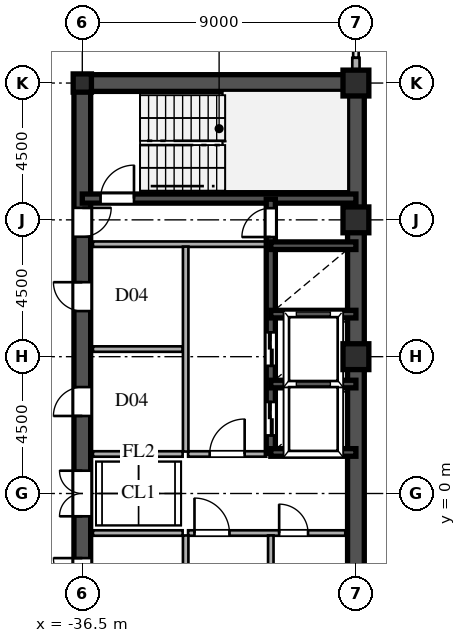
"""IFC4 building model, lengths in metres.
Left out: names, types, materials, properties, quantities, classifications, styles, units other than length and angle.
Written with IfcOpenShell. Run it as: python <this file> out.ifc"""

import sys

from ifc_helpers import new_model, si_unit, direction, frame, frame_2d, origin, origin_2d, place, context, subcontext, project, spatial, rectangle, hollow_rectangle, i_section, extrude, source, transform, mapped, element, fill, save


model = new_model("IFC4")
c1 = context("Model", 3, precision=1e-05, world=origin(), true_north=direction((0.0, 1.0)))
c2 = subcontext(c1, "Body", "Model", "MODEL_VIEW")
j1 = project(units=[si_unit("LENGTHUNIT", "METRE"), si_unit("PLANEANGLEUNIT", "RADIAN")], contexts=[c1])
p1 = place(None, origin())
s1 = spatial("IfcSite", under=j1, at=p1, CompositionType="ELEMENT")
p2 = place(p1, origin())
s2 = spatial("IfcBuilding", under=s1, at=p2, CompositionType="ELEMENT")
p3 = place(p2, frame((0.0, 0.0, 181.5)))
s3 = spatial("IfcBuildingStorey", under=s2, at=p3, CompositionType="ELEMENT", Elevation=181.5)
m1 = source(origin(), c2, "Body", "SweptSolid", [
    extrude(hollow_rectangle(XDim=0.85, YDim=0.85, WallThickness=0.036, at=origin_2d()), origin(), (0.0, 0.0, 1.0), 3.6),
])
for number, where, z_axis, x_axis in (
    (1, (-27.5, 4.5, 0.0), (0.0, 0.0, 1.0), (1.0, 0.0, 0.0)),
    (2, (-27.5, 9.0, 0.0), (0.0, 0.0, 1.0), (1.0, 0.0, 0.0)),
    (3, (-27.5, 13.5, 0.0), (0.0, 0.0, 1.0), (1.0, 0.0, 0.0)),
):
    element("IfcColumn", number, at=place(p3, frame(where, z_axis=z_axis, x_axis=x_axis)), inside=s3, PredefinedType="COLUMN", context=c2, shape_type="MappedRepresentation", body=[
        mapped(m1, transform((0.0, 0.0, 0.0), scale=1.0)),
    ])
m2 = source(origin(), c2, "Body", "SweptSolid", [
    extrude(i_section(OverallWidth=0.6, OverallDepth=0.6, WebThickness=0.025, FlangeThickness=0.04, at=origin_2d()), origin(), (0.0, 0.0, 1.0), 3.6),
])
p4 = place(p3, frame((-36.5, 13.5, 0.0), z_axis=(0.0, 0.0, 1.0), x_axis=(1.0, 0.0, 0.0)))
e4 = element("IfcColumn", 4, at=p4, inside=s3, PredefinedType="COLUMN", context=c2, shape_type="MappedRepresentation", body=[
    mapped(m2, transform((0.0, 0.0, 0.0), scale=1.0)),
])
p5 = place(p3, frame((-27.5, 13.78, 0.0), z_axis=(0.0, 0.0, 1.0), x_axis=(0.0, 1.0, 0.0)))
e5 = element("IfcWall", 5, at=p5, inside=s3, PredefinedType="SOLIDWALL", context=c2, shape_type="SweptSolid", body=[
    extrude(rectangle(XDim=0.55, YDim=0.24, at=frame_2d((0.275, 0.0))), origin(), (0.0, 0.0, 1.0), 2.88),
])
for number, where, z_axis, x_axis in (
    (6, (-27.5, -13.5, 0.0), (0.0, 0.0, 1.0), (0.0, 1.0, 0.0)),
    (7, (-27.5, 1.3, 0.0), (0.0, 0.0, 1.0), (0.0, 1.0, 0.0)),
):
    element("IfcWall", number, at=place(p3, frame(where, z_axis=z_axis, x_axis=x_axis)), inside=s3, PredefinedType="SHEAR", context=c2, shape_type="SweptSolid", body=[
        extrude(rectangle(XDim=12.2, YDim=0.55, at=frame_2d((6.1, 0.0))), origin(), (0.0, 0.0, 1.0), 3.38),
    ])
p6 = place(p3, frame((-27.5, -1.3, 0.0), z_axis=(0.0, 0.0, 1.0), x_axis=(0.0, 1.0, 0.0)))
e8 = element("IfcWall", 8, at=p6, inside=s3, PredefinedType="SHEAR", context=c2, shape_type="SweptSolid", body=[
    extrude(rectangle(XDim=2.6, YDim=0.55, at=frame_2d((1.3, 0.0))), origin(), (0.0, 0.0, 1.0), 3.38),
])
p7 = place(p3, frame((-36.5, 13.5, 0.0), z_axis=(0.0, 0.0, 1.0), x_axis=(1.0, 0.0, 0.0)))
e9 = element("IfcWall", 9, at=p7, inside=s3, PredefinedType="SHEAR", context=c2, shape_type="SweptSolid", body=[
    extrude(rectangle(XDim=9.0, YDim=0.55, at=frame_2d((4.5, 0.0))), origin(), (0.0, 0.0, 1.0), 3.38),
])
p8 = place(p3, frame((-36.5, -1.3, 0.0), z_axis=(0.0, 0.0, 1.0), x_axis=(0.0, 1.0, 0.0)))
e10 = element("IfcWall", 10, at=p8, inside=s3, PredefinedType="SHEAR", context=c2, shape_type="SweptSolid", body=[
    extrude(rectangle(XDim=2.6, YDim=0.55, at=frame_2d((1.3, 0.0))), origin(), (0.0, 0.0, 1.0), 3.38),
])
p9 = place(p8, frame((0.55, 0.0, 0.0)))
e11 = element("IfcOpeningElement", 11, at=p9, cuts=e10, PredefinedType="OPENING", context=c2, shape_type="SweptSolid", body=[
    extrude(rectangle(XDim=1.5, YDim=2.3, at=frame_2d((0.75, 1.15))), frame((0.0, 0.285, 0.0), z_axis=(0.0, -1.0, 0.0), x_axis=(1.0, 0.0, 0.0)), (0.0, 0.0, 1.0), 0.57),
])
p10 = place(p3, frame((-36.5, 8.2, 0.0), z_axis=(0.0, 0.0, 1.0), x_axis=(0.0, 1.0, 0.0)))
e12 = element("IfcWall", 12, at=p10, inside=s3, PredefinedType="SHEAR", context=c2, shape_type="SweptSolid", body=[
    extrude(rectangle(XDim=5.45, YDim=0.55, at=frame_2d((2.725, 0.0))), origin(), (0.0, 0.0, 1.0), 3.38),
])
p11 = place(p10, frame((0.245, 0.0, 0.0)))
e13 = element("IfcOpeningElement", 13, at=p11, cuts=e12, PredefinedType="OPENING", context=c2, shape_type="SweptSolid", body=[
    extrude(rectangle(XDim=0.95, YDim=2.15, at=frame_2d((0.475, 1.075))), frame((0.0, 0.285, 0.0), z_axis=(0.0, -1.0, 0.0), x_axis=(1.0, 0.0, 0.0)), (0.0, 0.0, 1.0), 0.57),
])
p12 = place(p3, frame((-36.5, -3.9, 0.0), z_axis=(0.0, 0.0, 1.0), x_axis=(0.0, 1.0, 0.0)))
e14 = element("IfcWall", 14, at=p12, inside=s3, PredefinedType="SHEAR", context=c2, shape_type="SweptSolid", body=[
    extrude(rectangle(XDim=2.6, YDim=0.55, at=frame_2d((1.3, 0.0))), origin(), (0.0, 0.0, 1.0), 3.38),
])
p13 = place(p12, frame((0.825, 0.0, 0.0)))
e15 = element("IfcOpeningElement", 15, at=p13, cuts=e14, PredefinedType="OPENING", context=c2, shape_type="SweptSolid", body=[
    extrude(rectangle(XDim=0.95, YDim=2.15, at=frame_2d((0.475, 1.075))), frame((0.0, 0.285, 0.0), z_axis=(0.0, -1.0, 0.0), x_axis=(1.0, 0.0, 0.0)), (0.0, 0.0, 1.0), 0.57),
])
p14 = place(p3, frame((-36.5, 1.3, 0.0), z_axis=(0.0, 0.0, 1.0), x_axis=(0.0, 1.0, 0.0)))
e16 = element("IfcWall", 16, at=p14, inside=s3, PredefinedType="SHEAR", context=c2, shape_type="SweptSolid", body=[
    extrude(rectangle(XDim=3.45, YDim=0.55, at=frame_2d((1.725, 0.0))), origin(), (0.0, 0.0, 1.0), 3.38),
])
p15 = place(p14, frame((1.25, 0.0, 0.0)))
e17 = element("IfcOpeningElement", 17, at=p15, cuts=e16, PredefinedType="OPENING", context=c2, shape_type="SweptSolid", body=[
    extrude(rectangle(XDim=0.95, YDim=2.15, at=frame_2d((0.475, 1.075))), frame((0.0, 0.285, 0.0), z_axis=(0.0, -1.0, 0.0), x_axis=(1.0, 0.0, 0.0)), (0.0, 0.0, 1.0), 0.57),
])
p16 = place(p3, frame((-36.5, 4.75, 0.0), z_axis=(0.0, 0.0, 1.0), x_axis=(0.0, 1.0, 0.0)))
e18 = element("IfcWall", 18, at=p16, inside=s3, PredefinedType="SHEAR", context=c2, shape_type="SweptSolid", body=[
    extrude(rectangle(XDim=3.45, YDim=0.55, at=frame_2d((1.725, 0.0))), origin(), (0.0, 0.0, 1.0), 3.38),
])
p17 = place(p16, frame((1.25, 0.0, 0.0)))
e19 = element("IfcOpeningElement", 19, at=p17, cuts=e18, PredefinedType="OPENING", context=c2, shape_type="SweptSolid", body=[
    extrude(rectangle(XDim=0.95, YDim=2.15, at=frame_2d((0.475, 1.075))), frame((0.0, 0.285, 0.0), z_axis=(0.0, -1.0, 0.0), x_axis=(1.0, 0.0, 0.0)), (0.0, 0.0, 1.0), 0.57),
])
p18 = place(p3, frame((-36.5, 9.7, 0.0), z_axis=(0.0, 0.0, 1.0), x_axis=(1.0, 0.0, 0.0)))
e20 = element("IfcWall", 20, at=p18, inside=s3, PredefinedType="SHEAR", context=c2, shape_type="SweptSolid", body=[
    extrude(rectangle(XDim=9.0, YDim=0.3, at=frame_2d((4.5, 0.0))), origin(), (0.0, 0.0, 1.0), 3.38),
])
p19 = place(p18, frame((0.6, 0.0, 0.0)))
e21 = element("IfcOpeningElement", 21, at=p19, cuts=e20, PredefinedType="OPENING", context=c2, shape_type="SweptSolid", body=[
    extrude(rectangle(XDim=1.1, YDim=2.2, at=frame_2d((0.55, 1.1))), frame((0.0, 0.16, 0.0), z_axis=(0.0, -1.0, 0.0), x_axis=(1.0, 0.0, 0.0)), (0.0, 0.0, 1.0), 0.32),
])
for number, where, z_axis, x_axis in (
    (22, (-30.3, 1.35, 0.0), (0.0, 0.0, 1.0), (1.0, 0.0, 0.0)),
    (23, (-30.3, 3.6, 0.0), (0.0, 0.0, 1.0), (1.0, 0.0, 0.0)),
    (24, (-30.3, 5.9, 0.0), (0.0, 0.0, 1.0), (1.0, 0.0, 0.0)),
    (25, (-30.3, 8.15, 0.0), (0.0, 0.0, 1.0), (1.0, 0.0, 0.0)),
):
    element("IfcWall", number, at=place(p3, frame(where, z_axis=z_axis, x_axis=x_axis)), inside=s3, PredefinedType="SHEAR", context=c2, shape_type="SweptSolid", body=[
        extrude(rectangle(XDim=2.8, YDim=0.25, at=frame_2d((1.4, 0.0))), origin(), (0.0, 0.0, 1.0), 3.38),
    ])
p20 = place(p3, frame((-30.3, 1.32, 0.0), z_axis=(0.0, 0.0, 1.0), x_axis=(0.0, 1.0, 0.0)))
e26 = element("IfcWall", 26, at=p20, inside=s3, PredefinedType="SHEAR", context=c2, shape_type="SweptSolid", body=[
    extrude(rectangle(XDim=2.28, YDim=0.3, at=frame_2d((1.14, 0.0))), origin(), (0.0, 0.0, 1.0), 3.38),
])
p21 = place(p20, frame((0.59, 0.0, 0.0)))
e27 = element("IfcOpeningElement", 27, at=p21, cuts=e26, PredefinedType="OPENING", context=c2, shape_type="SweptSolid", body=[
    extrude(rectangle(XDim=1.1, YDim=2.2, at=frame_2d((0.55, 1.1))), frame((0.0, 0.16, 0.0), z_axis=(0.0, -1.0, 0.0), x_axis=(1.0, 0.0, 0.0)), (0.0, 0.0, 1.0), 0.32),
])
p22 = place(p3, frame((-30.3, 3.6, 0.0), z_axis=(0.0, 0.0, 1.0), x_axis=(0.0, 1.0, 0.0)))
e28 = element("IfcWall", 28, at=p22, inside=s3, PredefinedType="SHEAR", context=c2, shape_type="SweptSolid", body=[
    extrude(rectangle(XDim=2.3, YDim=0.3, at=frame_2d((1.15, 0.0))), origin(), (0.0, 0.0, 1.0), 3.38),
])
p23 = place(p22, frame((0.6, 0.0, 0.0)))
e29 = element("IfcOpeningElement", 29, at=p23, cuts=e28, PredefinedType="OPENING", context=c2, shape_type="SweptSolid", body=[
    extrude(rectangle(XDim=1.1, YDim=2.2, at=frame_2d((0.55, 1.1))), frame((0.0, 0.16, 0.0), z_axis=(0.0, -1.0, 0.0), x_axis=(1.0, 0.0, 0.0)), (0.0, 0.0, 1.0), 0.32),
])
p24 = place(p3, frame((-30.3, 5.9, 0.0), z_axis=(0.0, 0.0, 1.0), x_axis=(0.0, 1.0, 0.0)))
e30 = element("IfcWall", 30, at=p24, inside=s3, PredefinedType="SHEAR", context=c2, shape_type="SweptSolid", body=[
    extrude(rectangle(XDim=2.25, YDim=0.3, at=frame_2d((1.125, 0.0))), origin(), (0.0, 0.0, 1.0), 3.38),
])
p25 = place(p3, frame((-30.3, 8.15, 0.0), z_axis=(0.0, 0.0, 1.0), x_axis=(0.0, 1.0, 0.0)))
e31 = element("IfcWall", 31, at=p25, inside=s3, PredefinedType="SHEAR", context=c2, shape_type="SweptSolid", body=[
    extrude(rectangle(XDim=1.53, YDim=0.3, at=frame_2d((0.765, 0.0))), origin(), (0.0, 0.0, 1.0), 3.38),
])
p26 = place(p25, frame((0.285, 0.0, 0.0)))
e32 = element("IfcOpeningElement", 32, at=p26, cuts=e31, PredefinedType="OPENING", context=c2, shape_type="SweptSolid", body=[
    extrude(rectangle(XDim=0.95, YDim=2.15, at=frame_2d((0.475, 1.075))), frame((0.0, 0.16, 0.0), z_axis=(0.0, -1.0, 0.0), x_axis=(1.0, 0.0, 0.0)), (0.0, 0.0, 1.0), 0.32),
])
p27 = place(p3, frame((-36.15, 8.2, 0.0), z_axis=(0.0, 0.0, 1.0), x_axis=(1.0, 0.0, 0.0)))
e33 = element("IfcWall", 33, at=p27, inside=s3, PredefinedType="PARTITIONING", context=c2, shape_type="SweptSolid", body=[
    extrude(rectangle(XDim=5.7, YDim=0.18, at=frame_2d((2.85, 0.0))), origin(), (0.0, 0.0, 1.0), 3.38),
])
p28 = place(p3, frame((-33.1, -6.42, 0.0), z_axis=(0.0, 0.0, 1.0), x_axis=(0.0, 1.0, 0.0)))
e34 = element("IfcWall", 34, at=p28, inside=s3, PredefinedType="PARTITIONING", context=c2, shape_type="SweptSolid", body=[
    extrude(rectangle(XDim=5.04, YDim=0.18, at=frame_2d((2.52, 0.0))), origin(), (0.0, 0.0, 1.0), 3.38),
])
p29 = place(p3, frame((-33.1, 1.38, 0.0), z_axis=(0.0, 0.0, 1.0), x_axis=(0.0, 1.0, 0.0)))
e35 = element("IfcWall", 35, at=p29, inside=s3, PredefinedType="PARTITIONING", context=c2, shape_type="SweptSolid", body=[
    extrude(rectangle(XDim=6.74, YDim=0.18, at=frame_2d((3.37, 0.0))), origin(), (0.0, 0.0, 1.0), 3.38),
])
p30 = place(p3, frame((-30.3, -1.3, 0.0), z_axis=(0.0, 0.0, 1.0), x_axis=(1.0, 0.0, 0.0)))
e36 = element("IfcWall", 36, at=p30, inside=s3, PredefinedType="PARTITIONING", context=c2, shape_type="SweptSolid", body=[
    extrude(rectangle(XDim=2.45, YDim=0.18, at=frame_2d((1.225, 0.0))), origin(), (0.0, 0.0, 1.0), 3.38),
])
p31 = place(p30, frame((0.275, 0.0, 0.0)))
e37 = element("IfcOpeningElement", 37, at=p31, cuts=e36, PredefinedType="OPENING", context=c2, shape_type="SweptSolid", body=[
    extrude(rectangle(XDim=0.95, YDim=2.15, at=frame_2d((0.475, 1.075))), frame((0.0, 0.1, 0.0), z_axis=(0.0, -1.0, 0.0), x_axis=(1.0, 0.0, 0.0)), (0.0, 0.0, 1.0), 0.2),
])
p32 = place(p3, frame((-33.02, -1.3, 0.0), z_axis=(0.0, 0.0, 1.0), x_axis=(1.0, 0.0, 0.0)))
e38 = element("IfcWall", 38, at=p32, inside=s3, PredefinedType="PARTITIONING", context=c2, shape_type="SweptSolid", body=[
    extrude(rectangle(XDim=2.72, YDim=0.18, at=frame_2d((1.36, 0.0))), origin(), (0.0, 0.0, 1.0), 3.38),
])
p33 = place(p32, frame((0.21, 0.0, 0.0)))
e39 = element("IfcOpeningElement", 39, at=p33, cuts=e38, PredefinedType="OPENING", context=c2, shape_type="SweptSolid", body=[
    extrude(rectangle(XDim=1.15, YDim=2.2, at=frame_2d((0.575, 1.1))), frame((0.0, 0.1, 0.0), z_axis=(0.0, -1.0, 0.0), x_axis=(1.0, 0.0, 0.0)), (0.0, 0.0, 1.0), 0.2),
])
p34 = place(p3, frame((-30.3, -7.12, 0.0), z_axis=(0.0, 0.0, 1.0), x_axis=(0.0, 1.0, 0.0)))
e40 = element("IfcWall", 40, at=p34, inside=s3, PredefinedType="PARTITIONING", context=c2, shape_type="SweptSolid", body=[
    extrude(rectangle(XDim=5.74, YDim=0.18, at=frame_2d((2.87, 0.0))), origin(), (0.0, 0.0, 1.0), 3.38),
])
p35 = place(p3, frame((-33.02, 1.3, 0.0), z_axis=(0.0, 0.0, 1.0), x_axis=(1.0, 0.0, 0.0)))
e41 = element("IfcWall", 41, at=p35, inside=s3, PredefinedType="PARTITIONING", context=c2, shape_type="SweptSolid", body=[
    extrude(rectangle(XDim=2.57, YDim=0.18, at=frame_2d((1.285, 0.0))), origin(), (0.0, 0.0, 1.0), 3.38),
])
p36 = place(p35, frame((0.71, 0.0, 0.0)))
e42 = element("IfcOpeningElement", 42, at=p36, cuts=e41, PredefinedType="OPENING", context=c2, shape_type="SweptSolid", body=[
    extrude(rectangle(XDim=1.15, YDim=2.2, at=frame_2d((0.575, 1.1))), frame((0.0, 0.1, 0.0), z_axis=(0.0, -1.0, 0.0), x_axis=(1.0, 0.0, 0.0)), (0.0, 0.0, 1.0), 0.2),
])
for number, where, z_axis, x_axis in (
    (43, (-36.15, -1.3, 0.0), (0.0, 0.0, 1.0), (1.0, 0.0, 0.0)),
    (44, (-36.15, 1.3, 0.0), (0.0, 0.0, 1.0), (1.0, 0.0, 0.0)),
    (45, (-36.15, 4.75, 0.0), (0.0, 0.0, 1.0), (1.0, 0.0, 0.0)),
):
    element("IfcWall", number, at=place(p3, frame(where, z_axis=z_axis, x_axis=x_axis)), inside=s3, PredefinedType="PARTITIONING", context=c2, shape_type="SweptSolid", body=[
        extrude(rectangle(XDim=2.95, YDim=0.18, at=frame_2d((1.475, 0.0))), origin(), (0.0, 0.0, 1.0), 3.38),
    ])
m3 = source(origin(), c2, "Body", "SweptSolid", [
    extrude(rectangle(XDim=1.5, YDim=2.3, at=frame_2d((0.75, 1.15))), frame((0.0, 0.025, 0.0), z_axis=(0.0, -1.0, 0.0), x_axis=(1.0, 0.0, 0.0)), (0.0, 0.0, 1.0), 0.05),
])
p37 = place(p9, origin())
e46 = element("IfcDoor", 46, at=p37, inside=s3, OperationType="DOUBLE_SWING_LEFT", PredefinedType="DOOR", context=c2, shape_type="MappedRepresentation", body=[
    mapped(m3, transform((0.0, 0.0, 0.0), scale=1.0)),
])
fill(e11, e46)
m4 = source(origin(), c2, "Body", "SweptSolid", [
    extrude(rectangle(XDim=0.95, YDim=2.15, at=frame_2d((0.475, 1.075))), frame((0.0, 0.025, 0.0), z_axis=(0.0, -1.0, 0.0), x_axis=(1.0, 0.0, 0.0)), (0.0, 0.0, 1.0), 0.05),
])
p38 = place(p11, frame((0.95, 0.0, 0.0), z_axis=(0.0, 0.0, 1.0), x_axis=(-1.0, 0.0, 0.0)))
e47 = element("IfcDoor", 47, at=p38, inside=s3, OperationType="SINGLE_SWING_RIGHT", PredefinedType="DOOR", context=c2, shape_type="MappedRepresentation", body=[
    mapped(m4, transform((0.0, 0.0, 0.0), scale=1.0)),
])
fill(e13, e47)
p39 = place(p13, origin())
e48 = element("IfcDoor", 48, at=p39, inside=s3, OperationType="SINGLE_SWING_RIGHT", PredefinedType="DOOR", context=c2, shape_type="MappedRepresentation", body=[
    mapped(m4, transform((0.0, 0.0, 0.0), scale=1.0)),
])
fill(e15, e48)
p40 = place(p15, origin())
e49 = element("IfcDoor", 49, at=p40, inside=s3, OperationType="SINGLE_SWING_LEFT", PredefinedType="DOOR", context=c2, shape_type="MappedRepresentation", body=[
    mapped(m4, transform((0.0, 0.0, 0.0), scale=1.0)),
])
fill(e17, e49)
p41 = place(p17, origin())
e50 = element("IfcDoor", 50, at=p41, inside=s3, OperationType="SINGLE_SWING_RIGHT", PredefinedType="DOOR", context=c2, shape_type="MappedRepresentation", body=[
    mapped(m4, transform((0.0, 0.0, 0.0), scale=1.0)),
])
fill(e19, e50)
m5 = source(origin(), c2, "Body", "SweptSolid", [
    extrude(rectangle(XDim=1.1, YDim=2.2, at=frame_2d((0.55, 1.1))), frame((0.0, 0.025, 0.0), z_axis=(0.0, -1.0, 0.0), x_axis=(1.0, 0.0, 0.0)), (0.0, 0.0, 1.0), 0.05),
])
p42 = place(p19, origin())
e51 = element("IfcDoor", 51, at=p42, inside=s3, OperationType="SINGLE_SWING_RIGHT", PredefinedType="DOOR", context=c2, shape_type="MappedRepresentation", body=[
    mapped(m5, transform((0.0, 0.0, 0.0), scale=1.0)),
])
fill(e21, e51)
m6 = source(origin(), c2, "Body", "SweptSolid", [
    extrude(rectangle(XDim=1.1, YDim=2.2, at=frame_2d((0.55, 1.1))), frame((0.0, 0.025, 0.0), z_axis=(0.0, -1.0, 0.0), x_axis=(1.0, 0.0, 0.0)), (0.0, 0.0, 1.0), 0.05),
])
p43 = place(p21, origin())
e52 = element("IfcDoor", 52, at=p43, inside=s3, OperationType="DOUBLE_DOOR_SLIDING", PredefinedType="DOOR", context=c2, shape_type="MappedRepresentation", body=[
    mapped(m6, transform((0.0, 0.0, 0.0), scale=1.0)),
])
fill(e27, e52)
p44 = place(p23, origin())
e53 = element("IfcDoor", 53, at=p44, inside=s3, OperationType="DOUBLE_DOOR_SLIDING", PredefinedType="DOOR", context=c2, shape_type="MappedRepresentation", body=[
    mapped(m6, transform((0.0, 0.0, 0.0), scale=1.0)),
])
fill(e29, e53)
p45 = place(p26, origin())
e54 = element("IfcDoor", 54, at=p45, inside=s3, OperationType="SINGLE_SWING_LEFT", PredefinedType="DOOR", context=c2, shape_type="MappedRepresentation", body=[
    mapped(m4, transform((0.0, 0.0, 0.0), scale=1.0)),
])
fill(e32, e54)
p46 = place(p31, origin())
e55 = element("IfcDoor", 55, at=p46, inside=s3, OperationType="SINGLE_SWING_LEFT", PredefinedType="DOOR", context=c2, shape_type="MappedRepresentation", body=[
    mapped(m4, transform((0.0, 0.0, 0.0), scale=1.0)),
])
fill(e37, e55)
m7 = source(origin(), c2, "Body", "SweptSolid", [
    extrude(rectangle(XDim=1.15, YDim=2.2, at=frame_2d((0.575, 1.1))), frame((0.0, 0.025, 0.0), z_axis=(0.0, -1.0, 0.0), x_axis=(1.0, 0.0, 0.0)), (0.0, 0.0, 1.0), 0.05),
])
p47 = place(p33, origin())
e56 = element("IfcDoor", 56, at=p47, inside=s3, OperationType="SINGLE_SWING_LEFT", PredefinedType="DOOR", context=c2, shape_type="MappedRepresentation", body=[
    mapped(m7, transform((0.0, 0.0, 0.0), scale=1.0)),
])
fill(e39, e56)
p48 = place(p36, origin())
e57 = element("IfcDoor", 57, at=p48, inside=s3, OperationType="SINGLE_SWING_RIGHT", PredefinedType="DOOR", context=c2, shape_type="MappedRepresentation", body=[
    mapped(m7, transform((0.0, 0.0, 0.0), scale=1.0)),
])
fill(e42, e57)
save(model, sys.argv[1])
